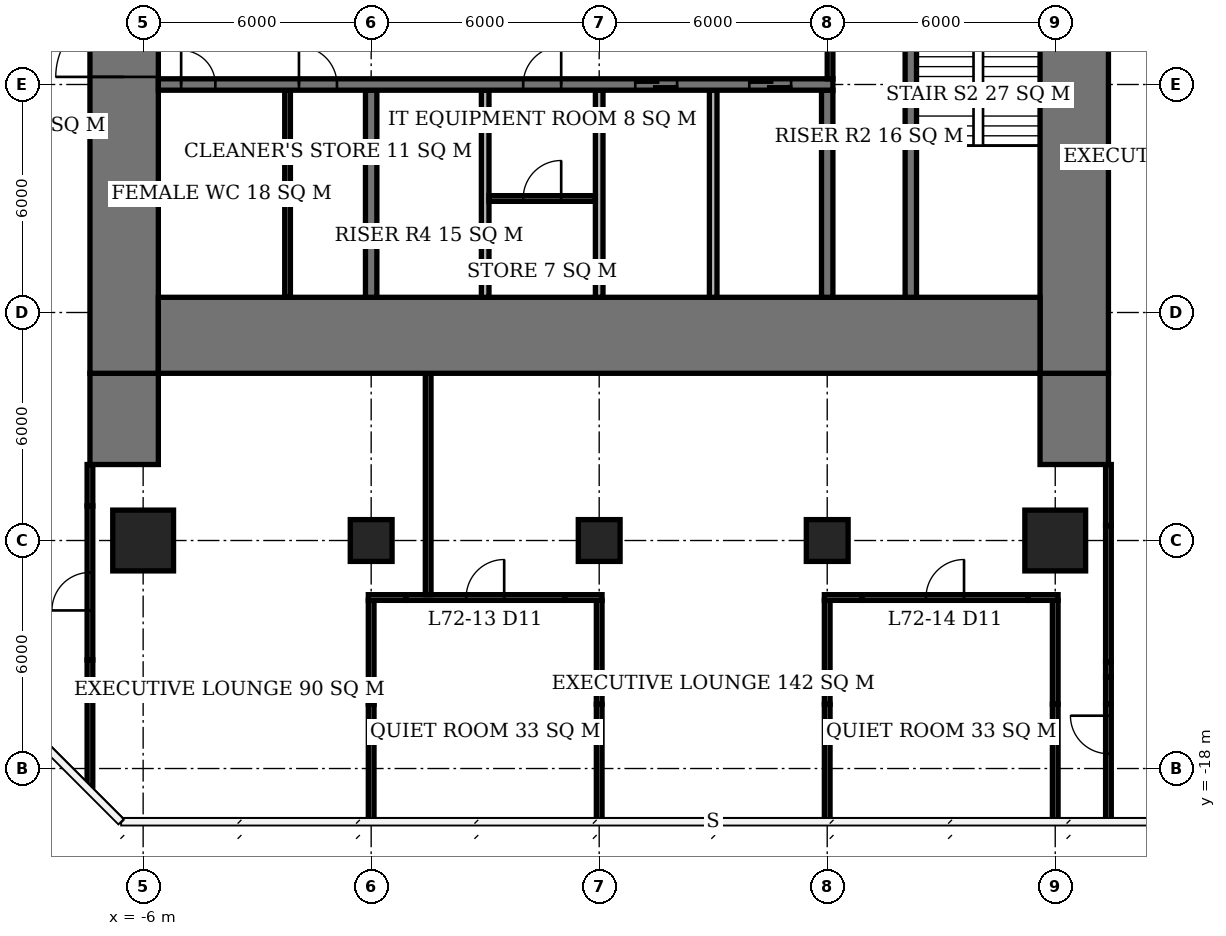
"""IFC4 building model, lengths in metres.
Left out: names, types, materials, properties, quantities, classifications, styles, units other than length and angle.
Written with IfcOpenShell. Run it as: python <this file> out.ifc"""

import sys

from ifc_helpers import new_model, si_unit, direction, frame, frame_2d, origin, origin_2d, place, context, subcontext, project, spatial, rectangle, extrude, element, fill, save


model = new_model("IFC4")
c1 = context("Model", 3, precision=1e-05, world=origin(), true_north=direction((0.0, 1.0)))
c2 = subcontext(c1, "Body", "Model", "MODEL_VIEW")
j1 = project(units=[si_unit("LENGTHUNIT", "METRE"), si_unit("PLANEANGLEUNIT", "RADIAN")], contexts=[c1])
p1 = place(None, origin())
s1 = spatial("IfcSite", under=j1, at=p1, CompositionType="ELEMENT")
p2 = place(p1, origin())
s2 = spatial("IfcBuilding", under=s1, at=p2, CompositionType="ELEMENT")
p3 = place(p2, frame((0.0, 0.0, 291.8)))
s3 = spatial("IfcBuildingStorey", under=s2, at=p3, CompositionType="ELEMENT", Elevation=291.8)
p4 = place(p3, frame((-6.0, -12.0, 0.0), z_axis=(0.0, 0.0, 1.0), x_axis=(1.0, 0.0, 0.0)))
e1 = element("IfcColumn", 1, at=p4, inside=s3, PredefinedType="COLUMN", context=c2, shape_type="SweptSolid", body=[
    extrude(rectangle(XDim=1.6, YDim=1.6, at=origin_2d()), origin(), (0.0, 0.0, 1.0), 3.9),
])
for number, where, z_axis, x_axis in (
    (2, (0.0, -12.0, 0.0), (0.0, 0.0, 1.0), (1.0, 0.0, 0.0)),
    (3, (6.0, -12.0, 0.0), (0.0, 0.0, 1.0), (1.0, 0.0, 0.0)),
    (4, (12.0, -12.0, 0.0), (0.0, 0.0, 1.0), (1.0, 0.0, 0.0)),
):
    element("IfcColumn", number, at=place(p3, frame(where, z_axis=z_axis, x_axis=x_axis)), inside=s3, PredefinedType="COLUMN", context=c2, shape_type="SweptSolid", body=[
        extrude(rectangle(XDim=1.1, YDim=1.1, at=origin_2d()), origin(), (0.0, 0.0, 1.0), 3.9),
    ])
p5 = place(p3, frame((18.0, -12.0, 0.0), z_axis=(0.0, 0.0, 1.0), x_axis=(1.0, 0.0, 0.0)))
e5 = element("IfcColumn", 5, at=p5, inside=s3, PredefinedType="COLUMN", context=c2, shape_type="SweptSolid", body=[
    extrude(rectangle(XDim=1.6, YDim=1.6, at=origin_2d()), origin(), (0.0, 0.0, 1.0), 3.9),
])
p6 = place(p3, frame((-5.6, -6.6, 0.0), z_axis=(0.0, 0.0, 1.0), x_axis=(1.0, 0.0, 0.0)))
e6 = element("IfcWall", 6, at=p6, inside=s3, PredefinedType="SHEAR", context=c2, shape_type="SweptSolid", body=[
    extrude(rectangle(XDim=23.2, YDim=2.0, at=frame_2d((11.6, 0.0))), origin(), (0.0, 0.0, 1.0), 3.9),
])
p7 = place(p3, frame((-6.5, -7.6, 0.0), z_axis=(0.0, 0.0, 1.0), x_axis=(0.0, 1.0, 0.0)))
e7 = element("IfcWall", 7, at=p7, inside=s3, PredefinedType="SHEAR", context=c2, shape_type="SweptSolid", body=[
    extrude(rectangle(XDim=21.2, YDim=1.8, at=frame_2d((10.6, 0.0))), origin(), (0.0, 0.0, 1.0), 3.9),
])
p8 = place(p7, frame((7.8, 0.0, 0.0)))
e8 = element("IfcOpeningElement", 8, at=p8, cuts=e7, PredefinedType="OPENING", context=c2, shape_type="SweptSolid", body=[
    extrude(rectangle(XDim=1.8, YDim=2.4, at=frame_2d((0.9, 1.2))), frame((0.0, 0.91, 0.0), z_axis=(0.0, -1.0, 0.0), x_axis=(1.0, 0.0, 0.0)), (0.0, 0.0, 1.0), 1.82),
])
p9 = place(p3, frame((18.5, -7.6, 0.0), z_axis=(0.0, 0.0, 1.0), x_axis=(0.0, 1.0, 0.0)))
e9 = element("IfcWall", 9, at=p9, inside=s3, PredefinedType="SHEAR", context=c2, shape_type="SweptSolid", body=[
    extrude(rectangle(XDim=21.2, YDim=1.8, at=frame_2d((10.6, 0.0))), origin(), (0.0, 0.0, 1.0), 3.9),
])
p10 = place(p9, frame((9.2, 0.0, 0.0)))
e10 = element("IfcOpeningElement", 10, at=p10, cuts=e9, PredefinedType="OPENING", context=c2, shape_type="SweptSolid", body=[
    extrude(rectangle(XDim=1.8, YDim=2.4, at=frame_2d((0.9, 1.2))), frame((0.0, 0.91, 0.0), z_axis=(0.0, -1.0, 0.0), x_axis=(1.0, 0.0, 0.0)), (0.0, 0.0, 1.0), 1.82),
])
for number, where, z_axis, x_axis in (
    (11, (-6.5, -10.0, 0.0), (0.0, 0.0, 1.0), (0.0, 1.0, 0.0)),
    (12, (18.5, -10.0, 0.0), (0.0, 0.0, 1.0), (0.0, 1.0, 0.0)),
):
    element("IfcWall", number, at=place(p3, frame(where, z_axis=z_axis, x_axis=x_axis)), inside=s3, PredefinedType="SHEAR", context=c2, shape_type="SweptSolid", body=[
        extrude(rectangle(XDim=2.4, YDim=1.8, at=frame_2d((1.2, 0.0))), origin(), (0.0, 0.0, 1.0), 3.9),
    ])
p11 = place(p3, frame((-5.6, 0.0, 0.0), z_axis=(0.0, 0.0, 1.0), x_axis=(1.0, 0.0, 0.0)))
e13 = element("IfcWall", 13, at=p11, inside=s3, PredefinedType="SHEAR", context=c2, shape_type="SweptSolid", body=[
    extrude(rectangle(XDim=17.75, YDim=0.3, at=frame_2d((8.875, 0.0))), origin(), (0.0, 0.0, 1.0), 3.9),
])
p12 = place(p11, frame((0.6, 0.0, 0.0)))
e14 = element("IfcOpeningElement", 14, at=p12, cuts=e13, PredefinedType="OPENING", context=c2, shape_type="SweptSolid", body=[
    extrude(rectangle(XDim=0.9, YDim=2.1, at=frame_2d((0.45, 1.05))), frame((0.0, 0.16, 0.0), z_axis=(0.0, -1.0, 0.0), x_axis=(1.0, 0.0, 0.0)), (0.0, 0.0, 1.0), 0.32),
])
p13 = place(p11, frame((3.7, 0.0, 0.0)))
e15 = element("IfcOpeningElement", 15, at=p13, cuts=e13, PredefinedType="OPENING", context=c2, shape_type="SweptSolid", body=[
    extrude(rectangle(XDim=1.0, YDim=2.1, at=frame_2d((0.5, 1.05))), frame((0.0, 0.16, 0.0), z_axis=(0.0, -1.0, 0.0), x_axis=(1.0, 0.0, 0.0)), (0.0, 0.0, 1.0), 0.32),
])
p14 = place(p11, frame((9.6, 0.0, 0.0)))
e16 = element("IfcOpeningElement", 16, at=p14, cuts=e13, PredefinedType="OPENING", context=c2, shape_type="SweptSolid", body=[
    extrude(rectangle(XDim=1.0, YDim=2.1, at=frame_2d((0.5, 1.05))), frame((0.0, 0.16, 0.0), z_axis=(0.0, -1.0, 0.0), x_axis=(1.0, 0.0, 0.0)), (0.0, 0.0, 1.0), 0.32),
])
p15 = place(p11, frame((12.55, 0.0, 0.0)))
e17 = element("IfcOpeningElement", 17, at=p15, cuts=e13, PredefinedType="OPENING", context=c2, shape_type="SweptSolid", body=[
    extrude(rectangle(XDim=1.1, YDim=2.1, at=frame_2d((0.55, 1.05))), frame((0.0, 0.16, 0.0), z_axis=(0.0, -1.0, 0.0), x_axis=(1.0, 0.0, 0.0)), (0.0, 0.0, 1.0), 0.32),
])
p16 = place(p11, frame((15.55, 0.0, 0.0)))
e18 = element("IfcOpeningElement", 18, at=p16, cuts=e13, PredefinedType="OPENING", context=c2, shape_type="SweptSolid", body=[
    extrude(rectangle(XDim=1.1, YDim=2.1, at=frame_2d((0.55, 1.05))), frame((0.0, 0.16, 0.0), z_axis=(0.0, -1.0, 0.0), x_axis=(1.0, 0.0, 0.0)), (0.0, 0.0, 1.0), 0.32),
])
for number, where, z_axis, x_axis in (
    (19, (0.0, -5.6, 0.0), (0.0, 0.0, 1.0), (0.0, 1.0, 0.0)),
    (20, (12.0, -5.6, 0.0), (0.0, 0.0, 1.0), (0.0, 1.0, 0.0)),
):
    element("IfcWall", number, at=place(p3, frame(where, z_axis=z_axis, x_axis=x_axis)), inside=s3, PredefinedType="SHEAR", context=c2, shape_type="SweptSolid", body=[
        extrude(rectangle(XDim=5.45, YDim=0.3, at=frame_2d((2.725, 0.0))), origin(), (0.0, 0.0, 1.0), 3.9),
    ])
p17 = place(p3, frame((14.2, -5.6, 0.0), z_axis=(0.0, 0.0, 1.0), x_axis=(0.0, 1.0, 0.0)))
e21 = element("IfcWall", 21, at=p17, inside=s3, PredefinedType="SHEAR", context=c2, shape_type="SweptSolid", body=[
    extrude(rectangle(XDim=8.45, YDim=0.3, at=frame_2d((4.225, 0.0))), origin(), (0.0, 0.0, 1.0), 3.9),
])
for number, where, z_axis, x_axis in (
    (22, (3.0, -5.6, 0.0), (0.0, 0.0, 1.0), (0.0, 1.0, 0.0)),
    (23, (6.0, -5.6, 0.0), (0.0, 0.0, 1.0), (0.0, 1.0, 0.0)),
    (24, (9.0, -5.6, 0.0), (0.0, 0.0, 1.0), (0.0, 1.0, 0.0)),
):
    element("IfcWall", number, at=place(p3, frame(where, z_axis=z_axis, x_axis=x_axis)), inside=s3, PredefinedType="SOLIDWALL", context=c2, shape_type="SweptSolid", body=[
        extrude(rectangle(XDim=5.45, YDim=0.2, at=frame_2d((2.725, 0.0))), origin(), (0.0, 0.0, 1.0), 3.9),
    ])
p18 = place(p3, frame((-2.2, -5.6, 0.0), z_axis=(0.0, 0.0, 1.0), x_axis=(0.0, 1.0, 0.0)))
e25 = element("IfcWall", 25, at=p18, inside=s3, PredefinedType="PLUMBINGWALL", context=c2, shape_type="SweptSolid", body=[
    extrude(rectangle(XDim=5.45, YDim=0.15, at=frame_2d((2.725, 0.0))), origin(), (0.0, 0.0, 1.0), 3.65),
])
p19 = place(p3, frame((3.1, -3.0, 0.0), z_axis=(0.0, 0.0, 1.0), x_axis=(1.0, 0.0, 0.0)))
e26 = element("IfcWall", 26, at=p19, inside=s3, PredefinedType="PARTITIONING", context=c2, shape_type="SweptSolid", body=[
    extrude(rectangle(XDim=2.8, YDim=0.15, at=frame_2d((1.4, 0.0))), origin(), (0.0, 0.0, 1.0), 3.65),
])
p20 = place(p19, frame((0.9, 0.0, 0.0)))
e27 = element("IfcOpeningElement", 27, at=p20, cuts=e26, PredefinedType="OPENING", context=c2, shape_type="SweptSolid", body=[
    extrude(rectangle(XDim=1.0, YDim=2.1, at=frame_2d((0.5, 1.05))), frame((0.0, 0.085, 0.0), z_axis=(0.0, -1.0, 0.0), x_axis=(1.0, 0.0, 0.0)), (0.0, 0.0, 1.0), 0.17),
])
p21 = place(p3, frame((-0.075, -13.5, 0.0), z_axis=(0.0, 0.0, 1.0), x_axis=(1.0, 0.0, 0.0)))
e28 = element("IfcWall", 28, at=p21, inside=s3, PredefinedType="PARTITIONING", context=c2, shape_type="SweptSolid", body=[
    extrude(rectangle(XDim=0.985, YDim=0.15, at=frame_2d((0.492, 0.0))), origin(), (0.0, 0.0, 1.0), 2.65),
])
p22 = place(p3, frame((0.91, -13.5, 0.0), z_axis=(0.0, 0.0, 1.0), x_axis=(1.0, 0.0, 0.0)))
e29 = element("IfcWall", 29, at=p22, inside=s3, PredefinedType="PARTITIONING", context=c2, shape_type="SweptSolid", body=[
    extrude(rectangle(XDim=4.18, YDim=0.15, at=frame_2d((2.09, 0.0))), origin(), (0.0, 0.0, 1.0), 3.65),
])
p23 = place(p22, frame((1.59, 0.0, 0.0)))
e30 = element("IfcOpeningElement", 30, at=p23, cuts=e29, PredefinedType="OPENING", context=c2, shape_type="SweptSolid", body=[
    extrude(rectangle(XDim=1.0, YDim=2.4, at=frame_2d((0.5, 1.2))), frame((0.0, 0.085, 0.0), z_axis=(0.0, -1.0, 0.0), x_axis=(1.0, 0.0, 0.0)), (0.0, 0.0, 1.0), 0.17),
])
for number, where, z_axis, x_axis in (
    (31, (5.09, -13.5, 0.0), (0.0, 0.0, 1.0), (1.0, 0.0, 0.0)),
    (32, (11.925, -13.5, 0.0), (0.0, 0.0, 1.0), (1.0, 0.0, 0.0)),
):
    element("IfcWall", number, at=place(p3, frame(where, z_axis=z_axis, x_axis=x_axis)), inside=s3, PredefinedType="PARTITIONING", context=c2, shape_type="SweptSolid", body=[
        extrude(rectangle(XDim=0.985, YDim=0.15, at=frame_2d((0.492, 0.0))), origin(), (0.0, 0.0, 1.0), 2.65),
    ])
p24 = place(p3, frame((12.91, -13.5, 0.0), z_axis=(0.0, 0.0, 1.0), x_axis=(1.0, 0.0, 0.0)))
e33 = element("IfcWall", 33, at=p24, inside=s3, PredefinedType="PARTITIONING", context=c2, shape_type="SweptSolid", body=[
    extrude(rectangle(XDim=4.38, YDim=0.15, at=frame_2d((2.19, 0.0))), origin(), (0.0, 0.0, 1.0), 3.65),
])
p25 = place(p24, frame((1.69, 0.0, 0.0)))
e34 = element("IfcOpeningElement", 34, at=p25, cuts=e33, PredefinedType="OPENING", context=c2, shape_type="SweptSolid", body=[
    extrude(rectangle(XDim=1.0, YDim=2.4, at=frame_2d((0.5, 1.2))), frame((0.0, 0.085, 0.0), z_axis=(0.0, -1.0, 0.0), x_axis=(1.0, 0.0, 0.0)), (0.0, 0.0, 1.0), 0.17),
])
p26 = place(p3, frame((17.29, -13.5, 0.0), z_axis=(0.0, 0.0, 1.0), x_axis=(1.0, 0.0, 0.0)))
e35 = element("IfcWall", 35, at=p26, inside=s3, PredefinedType="PARTITIONING", context=c2, shape_type="SweptSolid", body=[
    extrude(rectangle(XDim=0.785, YDim=0.15, at=frame_2d((0.393, 0.0))), origin(), (0.0, 0.0, 1.0), 2.65),
])
p27 = place(p3, frame((0.0, -19.375, 0.0), z_axis=(0.0, 0.0, 1.0), x_axis=(0.0, 1.0, 0.0)))
e36 = element("IfcWall", 36, at=p27, inside=s3, PredefinedType="PARTITIONING", context=c2, shape_type="SweptSolid", body=[
    extrude(rectangle(XDim=3.065, YDim=0.15, at=frame_2d((1.532, 0.0))), origin(), (0.0, 0.0, 1.0), 3.65),
])
p28 = place(p3, frame((0.0, -16.31, 0.0), z_axis=(0.0, 0.0, 1.0), x_axis=(0.0, 1.0, 0.0)))
e37 = element("IfcWall", 37, at=p28, inside=s3, PredefinedType="PARTITIONING", context=c2, shape_type="SweptSolid", body=[
    extrude(rectangle(XDim=2.735, YDim=0.15, at=frame_2d((1.368, 0.0))), origin(), (0.0, 0.0, 1.0), 2.65),
])
p29 = place(p3, frame((6.0, -19.35, 0.0), z_axis=(0.0, 0.0, 1.0), x_axis=(0.0, 1.0, 0.0)))
e38 = element("IfcWall", 38, at=p29, inside=s3, PredefinedType="PARTITIONING", context=c2, shape_type="SweptSolid", body=[
    extrude(rectangle(XDim=3.04, YDim=0.15, at=frame_2d((1.52, 0.0))), origin(), (0.0, 0.0, 1.0), 3.65),
])
p30 = place(p3, frame((6.0, -16.31, 0.0), z_axis=(0.0, 0.0, 1.0), x_axis=(0.0, 1.0, 0.0)))
e39 = element("IfcWall", 39, at=p30, inside=s3, PredefinedType="PARTITIONING", context=c2, shape_type="SweptSolid", body=[
    extrude(rectangle(XDim=2.735, YDim=0.15, at=frame_2d((1.368, 0.0))), origin(), (0.0, 0.0, 1.0), 2.65),
])
p31 = place(p3, frame((12.0, -19.35, 0.0), z_axis=(0.0, 0.0, 1.0), x_axis=(0.0, 1.0, 0.0)))
e40 = element("IfcWall", 40, at=p31, inside=s3, PredefinedType="PARTITIONING", context=c2, shape_type="SweptSolid", body=[
    extrude(rectangle(XDim=3.04, YDim=0.15, at=frame_2d((1.52, 0.0))), origin(), (0.0, 0.0, 1.0), 3.65),
])
p32 = place(p3, frame((12.0, -16.31, 0.0), z_axis=(0.0, 0.0, 1.0), x_axis=(0.0, 1.0, 0.0)))
e41 = element("IfcWall", 41, at=p32, inside=s3, PredefinedType="PARTITIONING", context=c2, shape_type="SweptSolid", body=[
    extrude(rectangle(XDim=2.735, YDim=0.15, at=frame_2d((1.368, 0.0))), origin(), (0.0, 0.0, 1.0), 2.65),
])
p33 = place(p3, frame((18.0, -19.375, 0.0), z_axis=(0.0, 0.0, 1.0), x_axis=(0.0, 1.0, 0.0)))
e42 = element("IfcWall", 42, at=p33, inside=s3, PredefinedType="PARTITIONING", context=c2, shape_type="SweptSolid", body=[
    extrude(rectangle(XDim=3.065, YDim=0.15, at=frame_2d((1.532, 0.0))), origin(), (0.0, 0.0, 1.0), 3.65),
])
p34 = place(p3, frame((18.0, -16.31, 0.0), z_axis=(0.0, 0.0, 1.0), x_axis=(0.0, 1.0, 0.0)))
e43 = element("IfcWall", 43, at=p34, inside=s3, PredefinedType="PARTITIONING", context=c2, shape_type="SweptSolid", body=[
    extrude(rectangle(XDim=2.735, YDim=0.15, at=frame_2d((1.368, 0.0))), origin(), (0.0, 0.0, 1.0), 2.65),
])
p35 = place(p3, frame((-7.4, -18.464, 0.0), z_axis=(0.0, 0.0, 1.0), x_axis=(0.0, 1.0, 0.0)))
e44 = element("IfcWall", 44, at=p35, inside=s3, PredefinedType="PARTITIONING", context=c2, shape_type="SweptSolid", body=[
    extrude(rectangle(XDim=3.324, YDim=0.15, at=frame_2d((1.662, 0.0))), origin(), (0.0, 0.0, 1.0), 3.65),
])
p36 = place(p3, frame((-7.4, -15.14, 0.0), z_axis=(0.0, 0.0, 1.0), x_axis=(0.0, 1.0, 0.0)))
e45 = element("IfcWall", 45, at=p36, inside=s3, PredefinedType="PARTITIONING", context=c2, shape_type="SweptSolid", body=[
    extrude(rectangle(XDim=4.05, YDim=0.15, at=frame_2d((2.025, 0.0))), origin(), (0.0, 0.0, 1.0), 2.65),
])
p37 = place(p36, frame((1.3, 0.0, 0.0)))
e46 = element("IfcOpeningElement", 46, at=p37, cuts=e45, PredefinedType="OPENING", context=c2, shape_type="SweptSolid", body=[
    extrude(rectangle(XDim=1.0, YDim=2.1, at=frame_2d((0.5, 1.05))), frame((0.0, 0.085, 0.0), z_axis=(0.0, -1.0, 0.0), x_axis=(1.0, 0.0, 0.0)), (0.0, 0.0, 1.0), 0.17),
])
p38 = place(p3, frame((-7.4, -11.09, 0.0), z_axis=(0.0, 0.0, 1.0), x_axis=(0.0, 1.0, 0.0)))
e47 = element("IfcWall", 47, at=p38, inside=s3, PredefinedType="PARTITIONING", context=c2, shape_type="SweptSolid", body=[
    extrude(rectangle(XDim=1.09, YDim=0.15, at=frame_2d((0.545, 0.0))), origin(), (0.0, 0.0, 1.0), 3.65),
])
p39 = place(p3, frame((1.5, -13.425, 0.0), z_axis=(0.0, 0.0, 1.0), x_axis=(0.0, 1.0, 0.0)))
e48 = element("IfcWall", 48, at=p39, inside=s3, PredefinedType="PARTITIONING", context=c2, shape_type="SweptSolid", body=[
    extrude(rectangle(XDim=5.825, YDim=0.15, at=frame_2d((2.913, 0.0))), origin(), (0.0, 0.0, 1.0), 3.65),
])
p40 = place(p3, frame((19.4, -19.375, 0.0), z_axis=(0.0, 0.0, 1.0), x_axis=(0.0, 1.0, 0.0)))
e49 = element("IfcWall", 49, at=p40, inside=s3, PredefinedType="PARTITIONING", context=c2, shape_type="SweptSolid", body=[
    extrude(rectangle(XDim=3.065, YDim=0.15, at=frame_2d((1.532, 0.0))), origin(), (0.0, 0.0, 1.0), 3.65),
])
p41 = place(p40, frame((1.765, 0.0, 0.0)))
e50 = element("IfcOpeningElement", 50, at=p41, cuts=e49, PredefinedType="OPENING", context=c2, shape_type="SweptSolid", body=[
    extrude(rectangle(XDim=1.0, YDim=2.4, at=frame_2d((0.5, 1.2))), frame((0.0, 0.085, 0.0), z_axis=(0.0, -1.0, 0.0), x_axis=(1.0, 0.0, 0.0)), (0.0, 0.0, 1.0), 0.17),
])
p42 = place(p3, frame((19.4, -16.31, 0.0), z_axis=(0.0, 0.0, 1.0), x_axis=(0.0, 1.0, 0.0)))
e51 = element("IfcWall", 51, at=p42, inside=s3, PredefinedType="PARTITIONING", context=c2, shape_type="SweptSolid", body=[
    extrude(rectangle(XDim=0.72, YDim=0.15, at=frame_2d((0.36, 0.0))), origin(), (0.0, 0.0, 1.0), 2.65),
])
p43 = place(p3, frame((19.4, -15.59, 0.0), z_axis=(0.0, 0.0, 1.0), x_axis=(0.0, 1.0, 0.0)))
e52 = element("IfcWall", 52, at=p43, inside=s3, PredefinedType="PARTITIONING", context=c2, shape_type="SweptSolid", body=[
    extrude(rectangle(XDim=0.398, YDim=0.15, at=frame_2d((0.199, 0.0))), origin(), (0.0, 0.0, 1.0), 3.65),
])
p44 = place(p3, frame((19.4, -15.192, 0.0), z_axis=(0.0, 0.0, 1.0), x_axis=(0.0, 1.0, 0.0)))
e53 = element("IfcWall", 53, at=p44, inside=s3, PredefinedType="PARTITIONING", context=c2, shape_type="SweptSolid", body=[
    extrude(rectangle(XDim=3.584, YDim=0.15, at=frame_2d((1.792, 0.0))), origin(), (0.0, 0.0, 1.0), 2.65),
])
p45 = place(p3, frame((19.4, -11.608, 0.0), z_axis=(0.0, 0.0, 1.0), x_axis=(0.0, 1.0, 0.0)))
e54 = element("IfcWall", 54, at=p45, inside=s3, PredefinedType="PARTITIONING", context=c2, shape_type="SweptSolid", body=[
    extrude(rectangle(XDim=1.608, YDim=0.15, at=frame_2d((0.804, 0.0))), origin(), (0.0, 0.0, 1.0), 3.65),
])
p46 = place(p3, frame((12.075, 0.15, 0.0), z_axis=(0.0, 0.0, 1.0), x_axis=(0.0, 1.0, 0.0)))
e55 = element("IfcWall", 55, at=p46, inside=s3, PredefinedType="PARTITIONING", context=c2, shape_type="SweptSolid", body=[
    extrude(rectangle(XDim=3.0, YDim=0.15, at=frame_2d((1.5, 0.0))), origin(), (0.0, 0.0, 1.0), 3.65),
])
p47 = place(p8, origin())
e56 = element("IfcDoor", 56, at=p47, inside=s3, OperationType="DOUBLE_DOOR_SINGLE_SWING", PredefinedType="DOOR", context=c2, shape_type="SweptSolid", body=[
    extrude(rectangle(XDim=1.8, YDim=2.4, at=frame_2d((0.9, 1.2))), frame((0.0, 0.025, 0.0), z_axis=(0.0, -1.0, 0.0), x_axis=(1.0, 0.0, 0.0)), (0.0, 0.0, 1.0), 0.05),
])
fill(e8, e56)
p48 = place(p12, origin())
e57 = element("IfcDoor", 57, at=p48, inside=s3, OperationType="SINGLE_SWING_LEFT", PredefinedType="DOOR", context=c2, shape_type="SweptSolid", body=[
    extrude(rectangle(XDim=0.9, YDim=2.1, at=frame_2d((0.45, 1.05))), frame((0.0, 0.025, 0.0), z_axis=(0.0, -1.0, 0.0), x_axis=(1.0, 0.0, 0.0)), (0.0, 0.0, 1.0), 0.05),
])
fill(e14, e57)
p49 = place(p13, origin())
e58 = element("IfcDoor", 58, at=p49, inside=s3, OperationType="SINGLE_SWING_LEFT", PredefinedType="DOOR", context=c2, shape_type="SweptSolid", body=[
    extrude(rectangle(XDim=1.0, YDim=2.1, at=frame_2d((0.5, 1.05))), frame((0.0, 0.025, 0.0), z_axis=(0.0, -1.0, 0.0), x_axis=(1.0, 0.0, 0.0)), (0.0, 0.0, 1.0), 0.05),
])
fill(e15, e58)
p50 = place(p20, origin())
e59 = element("IfcDoor", 59, at=p50, inside=s3, OperationType="SINGLE_SWING_RIGHT", PredefinedType="DOOR", context=c2, shape_type="SweptSolid", body=[
    extrude(rectangle(XDim=1.0, YDim=2.1, at=frame_2d((0.5, 1.05))), frame((0.0, 0.025, 0.0), z_axis=(0.0, -1.0, 0.0), x_axis=(1.0, 0.0, 0.0)), (0.0, 0.0, 1.0), 0.05),
])
fill(e27, e59)
p51 = place(p14, origin())
e60 = element("IfcDoor", 60, at=p51, inside=s3, OperationType="SINGLE_SWING_RIGHT", PredefinedType="DOOR", context=c2, shape_type="SweptSolid", body=[
    extrude(rectangle(XDim=1.0, YDim=2.1, at=frame_2d((0.5, 1.05))), frame((0.0, 0.025, 0.0), z_axis=(0.0, -1.0, 0.0), x_axis=(1.0, 0.0, 0.0)), (0.0, 0.0, 1.0), 0.05),
])
fill(e16, e60)
p52 = place(p15, origin())
e61 = element("IfcDoor", 61, at=p52, inside=s3, OperationType="DOUBLE_DOOR_SLIDING", PredefinedType="USERDEFINED", context=c2, shape_type="SweptSolid", body=[
    extrude(rectangle(XDim=1.1, YDim=2.1, at=frame_2d((0.55, 1.05))), frame((0.0, 0.025, 0.0), z_axis=(0.0, -1.0, 0.0), x_axis=(1.0, 0.0, 0.0)), (0.0, 0.0, 1.0), 0.05),
])
fill(e17, e61)
p53 = place(p16, origin())
e62 = element("IfcDoor", 62, at=p53, inside=s3, OperationType="DOUBLE_DOOR_SLIDING", PredefinedType="USERDEFINED", context=c2, shape_type="SweptSolid", body=[
    extrude(rectangle(XDim=1.1, YDim=2.1, at=frame_2d((0.55, 1.05))), frame((0.0, 0.025, 0.0), z_axis=(0.0, -1.0, 0.0), x_axis=(1.0, 0.0, 0.0)), (0.0, 0.0, 1.0), 0.05),
])
fill(e18, e62)
p54 = place(p23, origin())
e63 = element("IfcDoor", 63, at=p54, inside=s3, OperationType="SINGLE_SWING_RIGHT", PredefinedType="DOOR", context=c2, shape_type="SweptSolid", body=[
    extrude(rectangle(XDim=1.0, YDim=2.4, at=frame_2d((0.5, 1.2))), frame((0.0, 0.025, 0.0), z_axis=(0.0, -1.0, 0.0), x_axis=(1.0, 0.0, 0.0)), (0.0, 0.0, 1.0), 0.05),
])
fill(e30, e63)
p55 = place(p25, origin())
e64 = element("IfcDoor", 64, at=p55, inside=s3, OperationType="SINGLE_SWING_RIGHT", PredefinedType="DOOR", context=c2, shape_type="SweptSolid", body=[
    extrude(rectangle(XDim=1.0, YDim=2.4, at=frame_2d((0.5, 1.2))), frame((0.0, 0.025, 0.0), z_axis=(0.0, -1.0, 0.0), x_axis=(1.0, 0.0, 0.0)), (0.0, 0.0, 1.0), 0.05),
])
fill(e34, e64)
p56 = place(p41, origin())
e65 = element("IfcDoor", 65, at=p56, inside=s3, OperationType="SINGLE_SWING_RIGHT", PredefinedType="DOOR", context=c2, shape_type="SweptSolid", body=[
    extrude(rectangle(XDim=1.0, YDim=2.4, at=frame_2d((0.5, 1.2))), frame((0.0, 0.025, 0.0), z_axis=(0.0, -1.0, 0.0), x_axis=(1.0, 0.0, 0.0)), (0.0, 0.0, 1.0), 0.05),
])
fill(e50, e65)
p57 = place(p37, origin())
e66 = element("IfcDoor", 66, at=p57, inside=s3, OperationType="SINGLE_SWING_LEFT", PredefinedType="DOOR", context=c2, shape_type="SweptSolid", body=[
    extrude(rectangle(XDim=1.0, YDim=2.1, at=frame_2d((0.5, 1.05))), frame((0.0, 0.025, 0.0), z_axis=(0.0, -1.0, 0.0), x_axis=(1.0, 0.0, 0.0)), (0.0, 0.0, 1.0), 0.05),
])
fill(e46, e66)
save(model, sys.argv[1])
